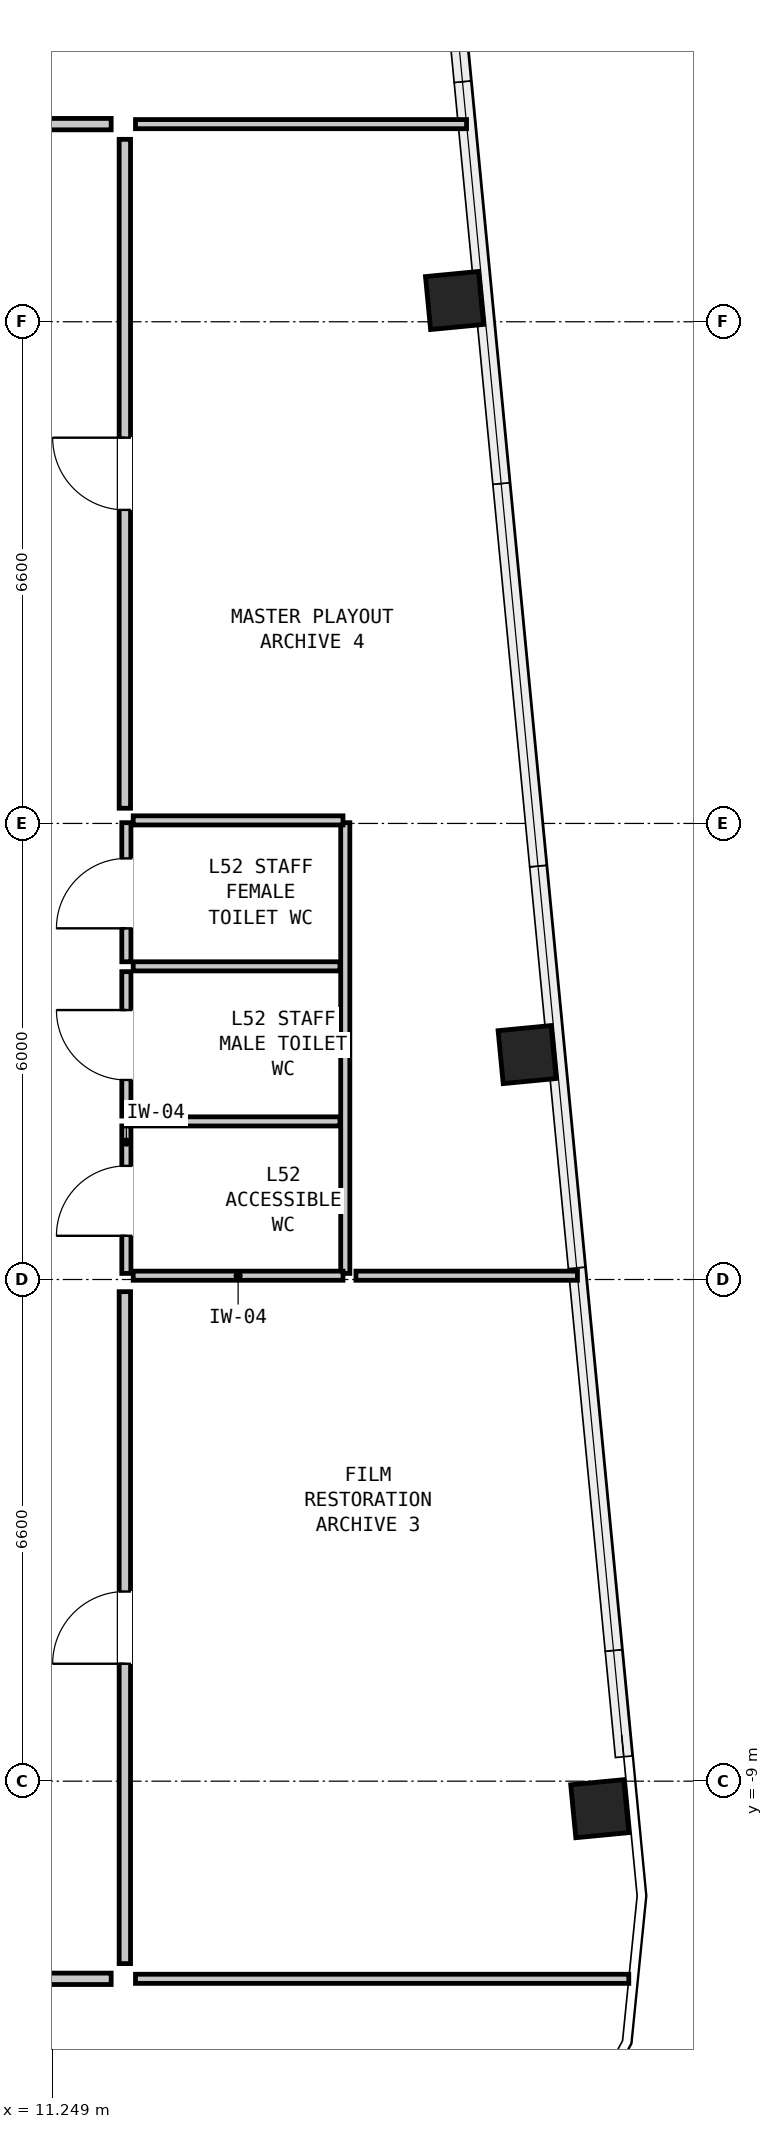
"""IFC4 building model, lengths in metres.
Left out: names, types, materials, properties, quantities, classifications, styles, units other than length and angle.
Written with IfcOpenShell. Run it as: python <this file> out.ifc"""

import sys

from ifc_helpers import new_model, si_unit, direction, frame, frame_2d, origin, origin_2d, place, context, subcontext, project, spatial, rectangle, hollow_rectangle, extrude, element, fill, save


model = new_model("IFC4")
c1 = context("Model", 3, precision=1e-05, world=origin(), true_north=direction((0.0, 1.0)))
c2 = subcontext(c1, "Body", "Model", "MODEL_VIEW")
j1 = project(units=[si_unit("LENGTHUNIT", "METRE"), si_unit("PLANEANGLEUNIT", "RADIAN")], contexts=[c1])
p1 = place(None, origin())
s1 = spatial("IfcSite", under=j1, at=p1, CompositionType="ELEMENT")
p2 = place(p1, origin())
s2 = spatial("IfcBuilding", under=s1, at=p2, CompositionType="ELEMENT")
p3 = place(p2, frame((0.0, 0.0, 177.5)))
s3 = spatial("IfcBuildingStorey", under=s2, at=p3, CompositionType="ELEMENT", Elevation=177.5)
for number, where, z_axis, x_axis in (
    (1, (18.448, -9.362, 0.0), (0.0, 0.0, 1.0), (-0.096, 0.995, 0.0)),
    (2, (17.493, 0.559, 0.0), (0.0, 0.0, 1.0), (-0.096, 0.995, 0.0)),
    (3, (16.537, 10.479, 0.0), (0.0, 0.0, 1.0), (-0.096, 0.995, 0.0)),
):
    element("IfcColumn", number, at=place(p3, frame(where, z_axis=z_axis, x_axis=x_axis)), inside=s3, PredefinedType="COLUMN", context=c2, shape_type="SweptSolid", body=[
        extrude(hollow_rectangle(XDim=0.7, YDim=0.7, WallThickness=0.045, at=origin_2d()), origin(), (0.0, 0.0, 1.0), 3.05),
    ])
p4 = place(p3, frame((12.22, -2.32, 0.0), z_axis=(0.0, 0.0, 1.0), x_axis=(0.0, 1.0, 0.0)))
e4 = element("IfcWall", 4, at=p4, inside=s3, PredefinedType="PARTITIONING", context=c2, shape_type="SweptSolid", body=[
    extrude(rectangle(XDim=1.94, YDim=0.12, at=frame_2d((0.97, 0.0))), origin(), (0.0, 0.0, 1.0), 2.83),
])
p5 = place(p4, frame((0.495, 0.0, 0.0)))
e5 = element("IfcOpeningElement", 5, at=p5, cuts=e4, PredefinedType="OPENING", context=c2, shape_type="SweptSolid", body=[
    extrude(rectangle(XDim=0.92, YDim=2.1, at=frame_2d((0.46, 1.05))), frame((0.0, 0.072, 0.0), z_axis=(0.0, -1.0, 0.0), x_axis=(1.0, 0.0, 0.0)), (0.0, 0.0, 1.0), 0.144),
])
p6 = place(p3, frame((12.22, -0.25, 0.0), z_axis=(0.0, 0.0, 1.0), x_axis=(0.0, 1.0, 0.0)))
e6 = element("IfcWall", 6, at=p6, inside=s3, PredefinedType="PARTITIONING", context=c2, shape_type="SweptSolid", body=[
    extrude(rectangle(XDim=1.9, YDim=0.12, at=frame_2d((0.95, 0.0))), origin(), (0.0, 0.0, 1.0), 2.83),
])
p7 = place(p6, frame((0.475, 0.0, 0.0)))
e7 = element("IfcOpeningElement", 7, at=p7, cuts=e6, PredefinedType="OPENING", context=c2, shape_type="SweptSolid", body=[
    extrude(rectangle(XDim=0.92, YDim=2.1, at=frame_2d((0.46, 1.05))), frame((0.0, 0.072, 0.0), z_axis=(0.0, -1.0, 0.0), x_axis=(1.0, 0.0, 0.0)), (0.0, 0.0, 1.0), 0.144),
])
p8 = place(p3, frame((12.22, 1.78, 0.0), z_axis=(0.0, 0.0, 1.0), x_axis=(0.0, 1.0, 0.0)))
e8 = element("IfcWall", 8, at=p8, inside=s3, PredefinedType="PARTITIONING", context=c2, shape_type="SweptSolid", body=[
    extrude(rectangle(XDim=1.83, YDim=0.12, at=frame_2d((0.915, 0.0))), origin(), (0.0, 0.0, 1.0), 2.83),
])
p9 = place(p8, frame((0.44, 0.0, 0.0)))
e9 = element("IfcOpeningElement", 9, at=p9, cuts=e8, PredefinedType="OPENING", context=c2, shape_type="SweptSolid", body=[
    extrude(rectangle(XDim=0.92, YDim=2.1, at=frame_2d((0.46, 1.05))), frame((0.0, 0.072, 0.0), z_axis=(0.0, -1.0, 0.0), x_axis=(1.0, 0.0, 0.0)), (0.0, 0.0, 1.0), 0.144),
])
p10 = place(p3, frame((15.1, -2.32, 0.0), z_axis=(0.0, 0.0, 1.0), x_axis=(0.0, 1.0, 0.0)))
e10 = element("IfcWall", 10, at=p10, inside=s3, PredefinedType="PARTITIONING", context=c2, shape_type="SweptSolid", body=[
    extrude(rectangle(XDim=5.93, YDim=0.12, at=frame_2d((2.965, 0.0))), origin(), (0.0, 0.0, 1.0), 2.83),
])
for number, where, z_axis, x_axis in (
    (11, (12.31, -2.35, 0.0), (0.0, 0.0, 1.0), (1.0, 0.0, 0.0)),
    (12, (12.31, 3.64, 0.0), (0.0, 0.0, 1.0), (1.0, 0.0, 0.0)),
):
    element("IfcWall", number, at=place(p3, frame(where, z_axis=z_axis, x_axis=x_axis)), inside=s3, PredefinedType="PARTITIONING", context=c2, shape_type="SweptSolid", body=[
        extrude(rectangle(XDim=2.76, YDim=0.12, at=frame_2d((1.38, 0.0))), origin(), (0.0, 0.0, 1.0), 1.883),
    ])
for number, where, z_axis, x_axis in (
    (13, (12.31, -0.32, 0.0), (0.0, 0.0, 1.0), (1.0, 0.0, 0.0)),
    (14, (12.31, 1.72, 0.0), (0.0, 0.0, 1.0), (1.0, 0.0, 0.0)),
):
    element("IfcWall", number, at=place(p3, frame(where, z_axis=z_axis, x_axis=x_axis)), inside=s3, PredefinedType="PARTITIONING", context=c2, shape_type="SweptSolid", body=[
        extrude(rectangle(XDim=2.72, YDim=0.12, at=frame_2d((1.36, 0.0))), origin(), (0.0, 0.0, 1.0), 2.83),
    ])
p11 = place(p3, frame((12.34, 12.8, 0.0), z_axis=(0.0, 0.0, 1.0), x_axis=(1.0, 0.0, 0.0)))
e15 = element("IfcWall", 15, at=p11, inside=s3, PredefinedType="PARTITIONING", context=c2, shape_type="SweptSolid", body=[
    extrude(rectangle(XDim=4.355, YDim=0.12, at=frame_2d((2.178, 0.0))), origin(), (0.0, 0.0, 1.0), 2.83),
])
p12 = place(p3, frame((12.34, -11.6, 0.0), z_axis=(0.0, 0.0, 1.0), x_axis=(1.0, 0.0, 0.0)))
e16 = element("IfcWall", 16, at=p12, inside=s3, PredefinedType="PARTITIONING", context=c2, shape_type="SweptSolid", body=[
    extrude(rectangle(XDim=6.49, YDim=0.12, at=frame_2d((3.245, 0.0))), origin(), (0.0, 0.0, 1.0), 2.347),
])
p13 = place(p3, frame((15.24, -2.35, 0.0), z_axis=(0.0, 0.0, 1.0), x_axis=(1.0, 0.0, 0.0)))
e17 = element("IfcWall", 17, at=p13, inside=s3, PredefinedType="PARTITIONING", context=c2, shape_type="SweptSolid", body=[
    extrude(rectangle(XDim=2.914, YDim=0.12, at=frame_2d((1.457, 0.0))), origin(), (0.0, 0.0, 1.0), 1.883),
])
p14 = place(p3, frame((6.68, 12.8, 0.0), z_axis=(0.0, 0.0, 1.0), x_axis=(1.0, 0.0, 0.0)))
e18 = element("IfcWall", 18, at=p14, inside=s3, PredefinedType="PARTITIONING", context=c2, shape_type="SweptSolid", body=[
    extrude(rectangle(XDim=5.34, YDim=0.15, at=frame_2d((2.67, 0.0))), origin(), (0.0, 0.0, 1.0), 2.83),
])
p15 = place(p14, frame((1.395, 0.0, 0.0)))
e19 = element("IfcOpeningElement", 19, at=p15, cuts=e18, PredefinedType="OPENING", context=c2, shape_type="SweptSolid", body=[
    extrude(rectangle(XDim=0.95, YDim=2.1, at=frame_2d((0.475, 1.05))), frame((0.0, 0.087, 0.0), z_axis=(0.0, -1.0, 0.0), x_axis=(1.0, 0.0, 0.0)), (0.0, 0.0, 1.0), 0.174),
])
p16 = place(p3, frame((7.68, -11.6, 0.0), z_axis=(0.0, 0.0, 1.0), x_axis=(1.0, 0.0, 0.0)))
e20 = element("IfcWall", 20, at=p16, inside=s3, PredefinedType="PARTITIONING", context=c2, shape_type="SweptSolid", body=[
    extrude(rectangle(XDim=4.34, YDim=0.15, at=frame_2d((2.17, 0.0))), origin(), (0.0, 0.0, 1.0), 2.347),
])
p17 = place(p16, frame((2.095, 0.0, 0.0)))
e21 = element("IfcOpeningElement", 21, at=p17, cuts=e20, PredefinedType="OPENING", context=c2, shape_type="SweptSolid", body=[
    extrude(rectangle(XDim=0.95, YDim=2.1, at=frame_2d((0.475, 1.05))), frame((0.0, 0.087, 0.0), z_axis=(0.0, -1.0, 0.0), x_axis=(1.0, 0.0, 0.0)), (0.0, 0.0, 1.0), 0.174),
])
p18 = place(p3, frame((12.2, -11.4, 0.0), z_axis=(0.0, 0.0, 1.0), x_axis=(0.0, 1.0, 0.0)))
e22 = element("IfcWall", 22, at=p18, inside=s3, PredefinedType="PARTITIONING", context=c2, shape_type="SweptSolid", body=[
    extrude(rectangle(XDim=8.84, YDim=0.15, at=frame_2d((4.42, 0.0))), origin(), (0.0, 0.0, 1.0), 2.83),
])
p19 = place(p18, frame((3.945, 0.0, 0.0)))
e23 = element("IfcOpeningElement", 23, at=p19, cuts=e22, PredefinedType="OPENING", context=c2, shape_type="SweptSolid", body=[
    extrude(rectangle(XDim=0.95, YDim=2.1, at=frame_2d((0.475, 1.05))), frame((0.0, 0.087, 0.0), z_axis=(0.0, -1.0, 0.0), x_axis=(1.0, 0.0, 0.0)), (0.0, 0.0, 1.0), 0.174),
])
p20 = place(p3, frame((12.2, 3.8, 0.0), z_axis=(0.0, 0.0, 1.0), x_axis=(0.0, 1.0, 0.0)))
e24 = element("IfcWall", 24, at=p20, inside=s3, PredefinedType="PARTITIONING", context=c2, shape_type="SweptSolid", body=[
    extrude(rectangle(XDim=8.8, YDim=0.15, at=frame_2d((4.4, 0.0))), origin(), (0.0, 0.0, 1.0), 2.83),
])
p21 = place(p20, frame((3.925, 0.0, 0.0)))
e25 = element("IfcOpeningElement", 25, at=p21, cuts=e24, PredefinedType="OPENING", context=c2, shape_type="SweptSolid", body=[
    extrude(rectangle(XDim=0.95, YDim=2.1, at=frame_2d((0.475, 1.05))), frame((0.0, 0.087, 0.0), z_axis=(0.0, -1.0, 0.0), x_axis=(1.0, 0.0, 0.0)), (0.0, 0.0, 1.0), 0.174),
])
p22 = place(p5, origin())
e26 = element("IfcDoor", 26, at=p22, inside=s3, OperationType="SINGLE_SWING_LEFT", PredefinedType="DOOR", context=c2, shape_type="SweptSolid", body=[
    extrude(rectangle(XDim=0.92, YDim=2.1, at=frame_2d((0.46, 1.05))), frame((0.0, 0.025, 0.0), z_axis=(0.0, -1.0, 0.0), x_axis=(1.0, 0.0, 0.0)), (0.0, 0.0, 1.0), 0.05),
])
fill(e5, e26)
p23 = place(p7, origin())
e27 = element("IfcDoor", 27, at=p23, inside=s3, OperationType="SINGLE_SWING_RIGHT", PredefinedType="DOOR", context=c2, shape_type="SweptSolid", body=[
    extrude(rectangle(XDim=0.92, YDim=2.1, at=frame_2d((0.46, 1.05))), frame((0.0, 0.025, 0.0), z_axis=(0.0, -1.0, 0.0), x_axis=(1.0, 0.0, 0.0)), (0.0, 0.0, 1.0), 0.05),
])
fill(e7, e27)
p24 = place(p9, origin())
e28 = element("IfcDoor", 28, at=p24, inside=s3, OperationType="SINGLE_SWING_LEFT", PredefinedType="DOOR", context=c2, shape_type="SweptSolid", body=[
    extrude(rectangle(XDim=0.92, YDim=2.1, at=frame_2d((0.46, 1.05))), frame((0.0, 0.025, 0.0), z_axis=(0.0, -1.0, 0.0), x_axis=(1.0, 0.0, 0.0)), (0.0, 0.0, 1.0), 0.05),
])
fill(e9, e28)
p25 = place(p19, origin())
e29 = element("IfcDoor", 29, at=p25, inside=s3, OperationType="SINGLE_SWING_LEFT", PredefinedType="DOOR", context=c2, shape_type="SweptSolid", body=[
    extrude(rectangle(XDim=0.95, YDim=2.1, at=frame_2d((0.475, 1.05))), frame((0.0, 0.025, 0.0), z_axis=(0.0, -1.0, 0.0), x_axis=(1.0, 0.0, 0.0)), (0.0, 0.0, 1.0), 0.05),
])
fill(e23, e29)
p26 = place(p21, origin())
e30 = element("IfcDoor", 30, at=p26, inside=s3, OperationType="SINGLE_SWING_RIGHT", PredefinedType="DOOR", context=c2, shape_type="SweptSolid", body=[
    extrude(rectangle(XDim=0.95, YDim=2.1, at=frame_2d((0.475, 1.05))), frame((0.0, 0.025, 0.0), z_axis=(0.0, -1.0, 0.0), x_axis=(1.0, 0.0, 0.0)), (0.0, 0.0, 1.0), 0.05),
])
fill(e25, e30)
save(model, sys.argv[1])
